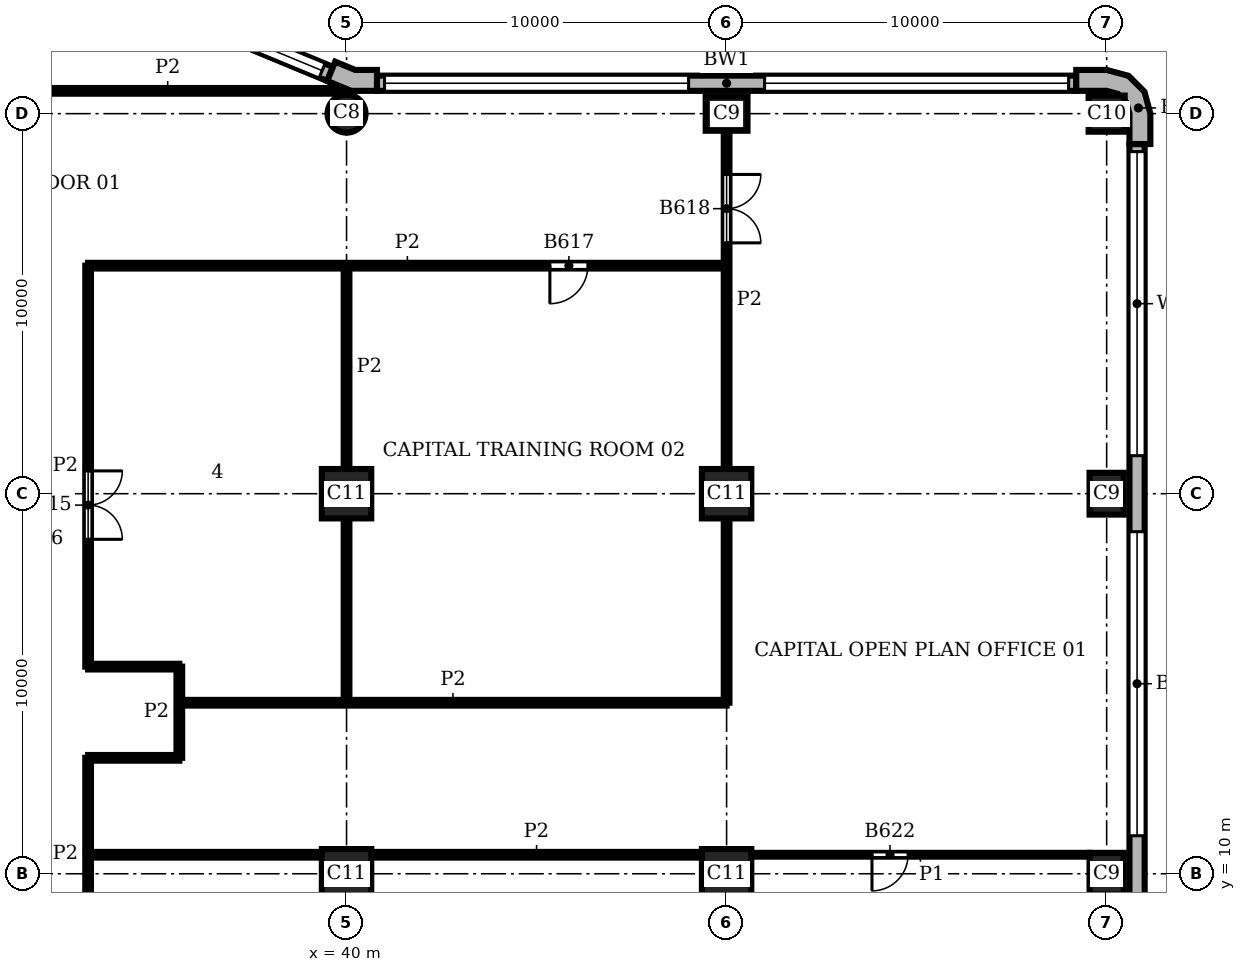
"""IFC4 building model, lengths in metres.
Left out: names, types, materials, properties, quantities, classifications, styles, units other than length and angle.
Written with IfcOpenShell. Run it as: python <this file> out.ifc"""

import sys

from ifc_helpers import new_model, si_unit, direction, frame, frame_2d, origin, origin_2d, place, context, subcontext, project, spatial, polyline, rectangle, circle, outline, extrude, element, fill, save


model = new_model("IFC4")
c1 = context("Model", 3, precision=1e-05, world=origin(), true_north=direction((0.0, 1.0)))
c2 = subcontext(c1, "Body", "Model", "MODEL_VIEW")
j1 = project(units=[si_unit("LENGTHUNIT", "METRE"), si_unit("PLANEANGLEUNIT", "RADIAN")], contexts=[c1])
p1 = place(None, origin())
s1 = spatial("IfcSite", under=j1, at=p1, CompositionType="ELEMENT")
p2 = place(p1, origin())
s2 = spatial("IfcBuilding", under=s1, at=p2, CompositionType="ELEMENT")
p3 = place(p2, frame((0.0, 0.0, 190.2)))
s3 = spatial("IfcBuildingStorey", under=s2, at=p3, CompositionType="ELEMENT", Elevation=190.2)
for number, where, z_axis, x_axis in (
    (1, (60.0, 10.0, 0.0), (0.0, 0.0, 1.0), (0.0, 1.0, 0.0)),
    (2, (60.0, 20.0, 0.0), (0.0, 0.0, 1.0), (0.0, 1.0, 0.0)),
):
    element("IfcColumn", number, at=place(p3, frame(where, z_axis=z_axis, x_axis=x_axis)), inside=s3, PredefinedType="COLUMN", context=c2, shape_type="SweptSolid", body=[
        extrude(rectangle(XDim=1.1, YDim=0.9, at=origin_2d()), origin(), (0.0, 0.0, 1.0), 3.9),
    ])
p4 = place(p3, frame((60.0, 30.0, 0.0), z_axis=(0.0, 0.0, 1.0), x_axis=(1.0, 0.0, 0.0)))
e3 = element("IfcColumn", 3, at=p4, inside=s3, PredefinedType="COLUMN", context=c2, shape_type="SweptSolid", body=[
    extrude(rectangle(XDim=0.95, YDim=0.95, at=origin_2d()), origin(), (0.0, 0.0, 1.0), 3.9),
])
p5 = place(p3, frame((50.0, 30.0, 0.0), z_axis=(0.0, 0.0, 1.0), x_axis=(1.0, 0.0, 0.0)))
e4 = element("IfcColumn", 4, at=p5, inside=s3, PredefinedType="COLUMN", context=c2, shape_type="SweptSolid", body=[
    extrude(rectangle(XDim=1.1, YDim=0.9, at=origin_2d()), origin(), (0.0, 0.0, 1.0), 3.9),
])
p6 = place(p3, frame((40.0, 30.0, 0.0), z_axis=(0.0, 0.0, 1.0), x_axis=(1.0, 0.0, 0.0)))
e5 = element("IfcColumn", 5, at=p6, inside=s3, PredefinedType="COLUMN", context=c2, shape_type="SweptSolid", body=[
    extrude(circle(Radius=0.5, at=origin_2d()), origin(), (0.0, 0.0, 1.0), 3.9),
])
for number, where, z_axis, x_axis in (
    (6, (40.0, 10.0, 0.0), (0.0, 0.0, 1.0), (1.0, 0.0, 0.0)),
    (7, (40.0, 20.0, 0.0), (0.0, 0.0, 1.0), (1.0, 0.0, 0.0)),
    (8, (50.0, 10.0, 0.0), (0.0, 0.0, 1.0), (1.0, 0.0, 0.0)),
    (9, (50.0, 20.0, 0.0), (0.0, 0.0, 1.0), (1.0, 0.0, 0.0)),
):
    element("IfcColumn", number, at=place(p3, frame(where, z_axis=z_axis, x_axis=x_axis)), inside=s3, PredefinedType="COLUMN", context=c2, shape_type="SweptSolid", body=[
        extrude(rectangle(XDim=1.3, YDim=1.3, at=origin_2d()), origin(), (0.0, 0.0, 1.0), 3.9),
    ])
p7 = place(p3, origin())
e10 = element("IfcWall", 10, at=p7, inside=s3, PredefinedType="SOLIDWALL", context=c2, shape_type="SweptSolid", body=[
    extrude(outline(polyline([(61.0, 29.2), (61.15, 29.2), (61.15, 30.0), (60.996, 30.575), (60.575, 30.996), (60.0, 31.15), (59.2, 31.15), (59.2, 31.0), (59.2, 30.6), (60.0, 30.6), (60.3, 30.52), (60.52, 30.3), (60.6, 30.0), (60.6, 29.2), (61.0, 29.2)])), origin(), (0.0, 0.0, 1.0), 3.9),
])
e11 = element("IfcWall", 11, at=p7, inside=s3, PredefinedType="SOLIDWALL", context=c2, shape_type="SweptSolid", body=[
    extrude(outline(polyline([(40.8, 31.0), (40.8, 31.15), (40.229, 31.15), (39.701, 31.369), (39.644, 31.23), (39.49, 30.861), (40.119, 30.6), (40.8, 30.6), (40.8, 31.0)])), origin(), (0.0, 0.0, 1.0), 3.9),
])
p8 = place(p3, frame((60.8, 0.8, 0.0), z_axis=(0.0, 0.0, 1.0), x_axis=(0.0, 1.0, 0.0)))
e12 = element("IfcWall", 12, at=p8, inside=s3, PredefinedType="SOLIDWALL", context=c2, shape_type="SweptSolid", body=[
    extrude(rectangle(XDim=28.4, YDim=0.4, at=frame_2d((14.2, 0.0))), origin(), (0.0, 0.0, 1.0), 3.9),
])
p9 = place(p8, frame((0.2, 0.0, 0.9)))
e13 = element("IfcOpeningElement", 13, at=p9, cuts=e12, PredefinedType="OPENING", context=c2, shape_type="SweptSolid", body=[
    extrude(rectangle(XDim=8.0, YDim=2.35, at=frame_2d((4.0, 1.175))), frame((0.0, 0.21, 0.0), z_axis=(0.0, -1.0, 0.0), x_axis=(1.0, 0.0, 0.0)), (0.0, 0.0, 1.0), 0.42),
])
p10 = place(p8, frame((10.2, 0.0, 0.9)))
e14 = element("IfcOpeningElement", 14, at=p10, cuts=e12, PredefinedType="OPENING", context=c2, shape_type="SweptSolid", body=[
    extrude(rectangle(XDim=8.0, YDim=2.35, at=frame_2d((4.0, 1.175))), frame((0.0, 0.21, 0.0), z_axis=(0.0, -1.0, 0.0), x_axis=(1.0, 0.0, 0.0)), (0.0, 0.0, 1.0), 0.42),
])
p11 = place(p8, frame((20.2, 0.0, 0.9)))
e15 = element("IfcOpeningElement", 15, at=p11, cuts=e12, PredefinedType="OPENING", context=c2, shape_type="SweptSolid", body=[
    extrude(rectangle(XDim=8.0, YDim=2.35, at=frame_2d((4.0, 1.175))), frame((0.0, 0.21, 0.0), z_axis=(0.0, -1.0, 0.0), x_axis=(1.0, 0.0, 0.0)), (0.0, 0.0, 1.0), 0.42),
])
p12 = place(p3, frame((59.2, 30.8, 0.0), z_axis=(0.0, 0.0, 1.0), x_axis=(-1.0, 0.0, 0.0)))
e16 = element("IfcWall", 16, at=p12, inside=s3, PredefinedType="SOLIDWALL", context=c2, shape_type="SweptSolid", body=[
    extrude(rectangle(XDim=18.4, YDim=0.4, at=frame_2d((9.2, 0.0))), origin(), (0.0, 0.0, 1.0), 3.9),
])
p13 = place(p12, frame((0.2, 0.0, 0.9)))
e17 = element("IfcOpeningElement", 17, at=p13, cuts=e16, PredefinedType="OPENING", context=c2, shape_type="SweptSolid", body=[
    extrude(rectangle(XDim=8.0, YDim=2.35, at=frame_2d((4.0, 1.175))), frame((0.0, 0.21, 0.0), z_axis=(0.0, -1.0, 0.0), x_axis=(1.0, 0.0, 0.0)), (0.0, 0.0, 1.0), 0.42),
])
p14 = place(p12, frame((10.2, 0.0, 0.9)))
e18 = element("IfcOpeningElement", 18, at=p14, cuts=e16, PredefinedType="OPENING", context=c2, shape_type="SweptSolid", body=[
    extrude(rectangle(XDim=8.0, YDim=2.35, at=frame_2d((4.0, 1.175))), frame((0.0, 0.21, 0.0), z_axis=(0.0, -1.0, 0.0), x_axis=(1.0, 0.0, 0.0)), (0.0, 0.0, 1.0), 0.42),
])
p15 = place(p3, frame((39.567, 31.045, 0.0), z_axis=(0.0, 0.0, 1.0), x_axis=(-0.923891000409, 0.382655745237, 0.0)))
e19 = element("IfcWall", 19, at=p15, inside=s3, PredefinedType="SOLIDWALL", context=c2, shape_type="SweptSolid", body=[
    extrude(rectangle(XDim=6.053, YDim=0.4, at=frame_2d((3.027, 0.0))), origin(), (0.0, 0.0, 1.0), 3.9),
])
p16 = place(p15, frame((0.227, 0.0, 0.9)))
e20 = element("IfcOpeningElement", 20, at=p16, cuts=e19, PredefinedType="OPENING", context=c2, shape_type="SweptSolid", body=[
    extrude(rectangle(XDim=5.6, YDim=2.35, at=frame_2d((2.8, 1.175))), frame((0.0, 0.21, 0.0), z_axis=(0.0, -1.0, 0.0), x_axis=(1.0, 0.0, 0.0)), (0.0, 0.0, 1.0), 0.42),
])
p17 = place(p3, frame((50.65, 10.5, 0.0), z_axis=(0.0, 0.0, 1.0), x_axis=(1.0, 0.0, 0.0)))
e21 = element("IfcWall", 21, at=p17, inside=s3, PredefinedType="PARTITIONING", context=c2, shape_type="SweptSolid", body=[
    extrude(rectangle(XDim=8.9, YDim=0.1, at=frame_2d((4.45, 0.0))), origin(), (0.0, 0.0, 1.0), 3.58),
])
p18 = place(p17, frame((3.175, 0.0, 0.0)))
e22 = element("IfcOpeningElement", 22, at=p18, cuts=e21, PredefinedType="OPENING", context=c2, shape_type="SweptSolid", body=[
    extrude(rectangle(XDim=0.95, YDim=2.1, at=frame_2d((0.475, 1.05))), frame((0.0, 0.06, 0.0), z_axis=(0.0, -1.0, 0.0), x_axis=(1.0, 0.0, 0.0)), (0.0, 0.0, 1.0), 0.12),
])
p19 = place(p3, frame((33.2, 8.0, 0.0), z_axis=(0.0, 0.0, 1.0), x_axis=(0.0, 1.0, 0.0)))
e23 = element("IfcWall", 23, at=p19, inside=s3, PredefinedType="PARTITIONING", context=c2, shape_type="SweptSolid", body=[
    extrude(rectangle(XDim=5.05, YDim=0.15, at=frame_2d((2.525, 0.0))), origin(), (0.0, 0.0, 1.0), 3.58),
])
p20 = place(p3, frame((33.2, 15.45, 0.0), z_axis=(0.0, 0.0, 1.0), x_axis=(0.0, 1.0, 0.0)))
e24 = element("IfcWall", 24, at=p20, inside=s3, PredefinedType="PARTITIONING", context=c2, shape_type="SweptSolid", body=[
    extrude(rectangle(XDim=10.55, YDim=0.15, at=frame_2d((5.275, 0.0))), origin(), (0.0, 0.0, 1.0), 3.58),
])
p21 = place(p20, frame((3.35, 0.0, 0.0)))
e25 = element("IfcOpeningElement", 25, at=p21, cuts=e24, PredefinedType="OPENING", context=c2, shape_type="SweptSolid", body=[
    extrude(rectangle(XDim=1.8, YDim=2.1, at=frame_2d((0.9, 1.05))), frame((0.0, 0.085, 0.0), z_axis=(0.0, -1.0, 0.0), x_axis=(1.0, 0.0, 0.0)), (0.0, 0.0, 1.0), 0.17),
])
p22 = place(p3, frame((35.6, 13.05, 0.0), z_axis=(0.0, 0.0, 1.0), x_axis=(0.0, 1.0, 0.0)))
e26 = element("IfcWall", 26, at=p22, inside=s3, PredefinedType="PARTITIONING", context=c2, shape_type="SweptSolid", body=[
    extrude(rectangle(XDim=2.4, YDim=0.15, at=frame_2d((1.2, 0.0))), origin(), (0.0, 0.0, 1.0), 3.58),
])
p23 = place(p3, frame((40.0, 14.5, 0.0), z_axis=(0.0, 0.0, 1.0), x_axis=(0.0, 1.0, 0.0)))
e27 = element("IfcWall", 27, at=p23, inside=s3, PredefinedType="PARTITIONING", context=c2, shape_type="SweptSolid", body=[
    extrude(rectangle(XDim=4.85, YDim=0.15, at=frame_2d((2.425, 0.0))), origin(), (0.0, 0.0, 1.0), 3.58),
])
p24 = place(p3, frame((40.0, 20.65, 0.0), z_axis=(0.0, 0.0, 1.0), x_axis=(0.0, 1.0, 0.0)))
e28 = element("IfcWall", 28, at=p24, inside=s3, PredefinedType="PARTITIONING", context=c2, shape_type="SweptSolid", body=[
    extrude(rectangle(XDim=5.35, YDim=0.15, at=frame_2d((2.675, 0.0))), origin(), (0.0, 0.0, 1.0), 3.58),
])
p25 = place(p3, frame((50.0, 14.5, 0.0), z_axis=(0.0, 0.0, 1.0), x_axis=(0.0, 1.0, 0.0)))
e29 = element("IfcWall", 29, at=p25, inside=s3, PredefinedType="PARTITIONING", context=c2, shape_type="SweptSolid", body=[
    extrude(rectangle(XDim=4.85, YDim=0.15, at=frame_2d((2.425, 0.0))), origin(), (0.0, 0.0, 1.0), 3.58),
])
p26 = place(p3, frame((50.0, 20.65, 0.0), z_axis=(0.0, 0.0, 1.0), x_axis=(0.0, 1.0, 0.0)))
e30 = element("IfcWall", 30, at=p26, inside=s3, PredefinedType="PARTITIONING", context=c2, shape_type="SweptSolid", body=[
    extrude(rectangle(XDim=8.9, YDim=0.15, at=frame_2d((4.45, 0.0))), origin(), (0.0, 0.0, 1.0), 3.58),
])
p27 = place(p26, frame((5.95, 0.0, 0.0)))
e31 = element("IfcOpeningElement", 31, at=p27, cuts=e30, PredefinedType="OPENING", context=c2, shape_type="SweptSolid", body=[
    extrude(rectangle(XDim=1.8, YDim=2.1, at=frame_2d((0.9, 1.05))), frame((0.0, 0.085, 0.0), z_axis=(0.0, -1.0, 0.0), x_axis=(1.0, 0.0, 0.0)), (0.0, 0.0, 1.0), 0.17),
])
p28 = place(p3, frame((33.2, 10.5, 0.0), z_axis=(0.0, 0.0, 1.0), x_axis=(1.0, 0.0, 0.0)))
e32 = element("IfcWall", 32, at=p28, inside=s3, PredefinedType="PARTITIONING", context=c2, shape_type="SweptSolid", body=[
    extrude(rectangle(XDim=6.15, YDim=0.15, at=frame_2d((3.075, 0.0))), origin(), (0.0, 0.0, 1.0), 3.58),
])
p29 = place(p3, frame((40.65, 10.5, 0.0), z_axis=(0.0, 0.0, 1.0), x_axis=(1.0, 0.0, 0.0)))
e33 = element("IfcWall", 33, at=p29, inside=s3, PredefinedType="PARTITIONING", context=c2, shape_type="SweptSolid", body=[
    extrude(rectangle(XDim=8.7, YDim=0.15, at=frame_2d((4.35, 0.0))), origin(), (0.0, 0.0, 1.0), 3.58),
])
p30 = place(p3, frame((33.2, 13.05, 0.0), z_axis=(0.0, 0.0, 1.0), x_axis=(1.0, 0.0, 0.0)))
e34 = element("IfcWall", 34, at=p30, inside=s3, PredefinedType="PARTITIONING", context=c2, shape_type="SweptSolid", body=[
    extrude(rectangle(XDim=2.4, YDim=0.15, at=frame_2d((1.2, 0.0))), origin(), (0.0, 0.0, 1.0), 3.58),
])
p31 = place(p3, frame((35.6, 14.5, 0.0), z_axis=(0.0, 0.0, 1.0), x_axis=(1.0, 0.0, 0.0)))
e35 = element("IfcWall", 35, at=p31, inside=s3, PredefinedType="PARTITIONING", context=c2, shape_type="SweptSolid", body=[
    extrude(rectangle(XDim=14.4, YDim=0.15, at=frame_2d((7.2, 0.0))), origin(), (0.0, 0.0, 1.0), 3.58),
])
p32 = place(p3, frame((33.2, 15.45, 0.0), z_axis=(0.0, 0.0, 1.0), x_axis=(1.0, 0.0, 0.0)))
e36 = element("IfcWall", 36, at=p32, inside=s3, PredefinedType="PARTITIONING", context=c2, shape_type="SweptSolid", body=[
    extrude(rectangle(XDim=2.4, YDim=0.15, at=frame_2d((1.2, 0.0))), origin(), (0.0, 0.0, 1.0), 3.58),
])
p33 = place(p3, frame((33.2, 26.0, 0.0), z_axis=(0.0, 0.0, 1.0), x_axis=(1.0, 0.0, 0.0)))
e37 = element("IfcWall", 37, at=p33, inside=s3, PredefinedType="PARTITIONING", context=c2, shape_type="SweptSolid", body=[
    extrude(rectangle(XDim=16.8, YDim=0.15, at=frame_2d((8.4, 0.0))), origin(), (0.0, 0.0, 1.0), 3.58),
])
p34 = place(p33, frame((12.15, 0.0, 0.0)))
e38 = element("IfcOpeningElement", 38, at=p34, cuts=e37, PredefinedType="OPENING", context=c2, shape_type="SweptSolid", body=[
    extrude(rectangle(XDim=1.0, YDim=2.1, at=frame_2d((0.5, 1.05))), frame((0.0, 0.085, 0.0), z_axis=(0.0, -1.0, 0.0), x_axis=(1.0, 0.0, 0.0)), (0.0, 0.0, 1.0), 0.17),
])
p35 = place(p3, frame((30.65, 30.6, 0.0), z_axis=(0.0, 0.0, 1.0), x_axis=(1.0, 0.0, 0.0)))
e39 = element("IfcWall", 39, at=p35, inside=s3, PredefinedType="PARTITIONING", context=c2, shape_type="SweptSolid", body=[
    extrude(rectangle(XDim=9.288, YDim=0.15, at=frame_2d((4.644, 0.0))), origin(), (0.0, 0.0, 1.0), 3.58),
])
p36 = place(p10, origin())
e40 = element("IfcWindow", 40, at=p36, inside=s3, PartitioningType="SINGLE_PANEL", PredefinedType="WINDOW", context=c2, shape_type="SweptSolid", body=[
    extrude(rectangle(XDim=8.0, YDim=2.35, at=frame_2d((4.0, 1.175))), frame((0.0, 0.16, 0.0), z_axis=(0.0, -1.0, 0.0), x_axis=(1.0, 0.0, 0.0)), (0.0, 0.0, 1.0), 0.06),
])
fill(e14, e40)
p37 = place(p11, origin())
e41 = element("IfcWindow", 41, at=p37, inside=s3, PartitioningType="SINGLE_PANEL", PredefinedType="WINDOW", context=c2, shape_type="SweptSolid", body=[
    extrude(rectangle(XDim=8.0, YDim=2.35, at=frame_2d((4.0, 1.175))), frame((0.0, 0.16, 0.0), z_axis=(0.0, -1.0, 0.0), x_axis=(1.0, 0.0, 0.0)), (0.0, 0.0, 1.0), 0.06),
])
fill(e15, e41)
p38 = place(p13, origin())
e42 = element("IfcWindow", 42, at=p38, inside=s3, PartitioningType="SINGLE_PANEL", PredefinedType="WINDOW", context=c2, shape_type="SweptSolid", body=[
    extrude(rectangle(XDim=8.0, YDim=2.35, at=frame_2d((4.0, 1.175))), frame((0.0, 0.16, 0.0), z_axis=(0.0, -1.0, 0.0), x_axis=(1.0, 0.0, 0.0)), (0.0, 0.0, 1.0), 0.06),
])
fill(e17, e42)
p39 = place(p14, origin())
e43 = element("IfcWindow", 43, at=p39, inside=s3, PartitioningType="SINGLE_PANEL", PredefinedType="WINDOW", context=c2, shape_type="SweptSolid", body=[
    extrude(rectangle(XDim=8.0, YDim=2.35, at=frame_2d((4.0, 1.175))), frame((0.0, 0.16, 0.0), z_axis=(0.0, -1.0, 0.0), x_axis=(1.0, 0.0, 0.0)), (0.0, 0.0, 1.0), 0.06),
])
fill(e18, e43)
p40 = place(p16, origin())
e44 = element("IfcWindow", 44, at=p40, inside=s3, PartitioningType="SINGLE_PANEL", PredefinedType="WINDOW", context=c2, shape_type="SweptSolid", body=[
    extrude(rectangle(XDim=5.6, YDim=2.35, at=frame_2d((2.8, 1.175))), frame((0.0, 0.16, 0.0), z_axis=(0.0, -1.0, 0.0), x_axis=(1.0, 0.0, 0.0)), (0.0, 0.0, 1.0), 0.06),
])
fill(e20, e44)
p41 = place(p21, frame((1.8, 0.0, 0.0), z_axis=(0.0, 0.0, 1.0), x_axis=(-1.0, 0.0, 0.0)))
e45 = element("IfcDoor", 45, at=p41, inside=s3, OperationType="DOUBLE_DOOR_SINGLE_SWING", PredefinedType="DOOR", context=c2, shape_type="SweptSolid", body=[
    extrude(rectangle(XDim=1.8, YDim=2.1, at=frame_2d((0.9, 1.05))), frame((0.0, 0.025, 0.0), z_axis=(0.0, -1.0, 0.0), x_axis=(1.0, 0.0, 0.0)), (0.0, 0.0, 1.0), 0.05),
])
fill(e25, e45)
p42 = place(p34, frame((1.0, 0.0, 0.0), z_axis=(0.0, 0.0, 1.0), x_axis=(-1.0, 0.0, 0.0)))
e46 = element("IfcDoor", 46, at=p42, inside=s3, OperationType="SINGLE_SWING_RIGHT", PredefinedType="DOOR", context=c2, shape_type="SweptSolid", body=[
    extrude(rectangle(XDim=1.0, YDim=2.1, at=frame_2d((0.5, 1.05))), frame((0.0, 0.025, 0.0), z_axis=(0.0, -1.0, 0.0), x_axis=(1.0, 0.0, 0.0)), (0.0, 0.0, 1.0), 0.05),
])
fill(e38, e46)
p43 = place(p27, frame((1.8, 0.0, 0.0), z_axis=(0.0, 0.0, 1.0), x_axis=(-1.0, 0.0, 0.0)))
e47 = element("IfcDoor", 47, at=p43, inside=s3, OperationType="DOUBLE_DOOR_SINGLE_SWING", PredefinedType="DOOR", context=c2, shape_type="SweptSolid", body=[
    extrude(rectangle(XDim=1.8, YDim=2.1, at=frame_2d((0.9, 1.05))), frame((0.0, 0.025, 0.0), z_axis=(0.0, -1.0, 0.0), x_axis=(1.0, 0.0, 0.0)), (0.0, 0.0, 1.0), 0.05),
])
fill(e31, e47)
p44 = place(p18, frame((0.95, 0.0, 0.0), z_axis=(0.0, 0.0, 1.0), x_axis=(-1.0, 0.0, 0.0)))
e48 = element("IfcDoor", 48, at=p44, inside=s3, OperationType="SINGLE_SWING_RIGHT", PredefinedType="DOOR", context=c2, shape_type="SweptSolid", body=[
    extrude(rectangle(XDim=0.95, YDim=2.1, at=frame_2d((0.475, 1.05))), frame((0.0, 0.025, 0.0), z_axis=(0.0, -1.0, 0.0), x_axis=(1.0, 0.0, 0.0)), (0.0, 0.0, 1.0), 0.05),
])
fill(e22, e48)
save(model, sys.argv[1])
